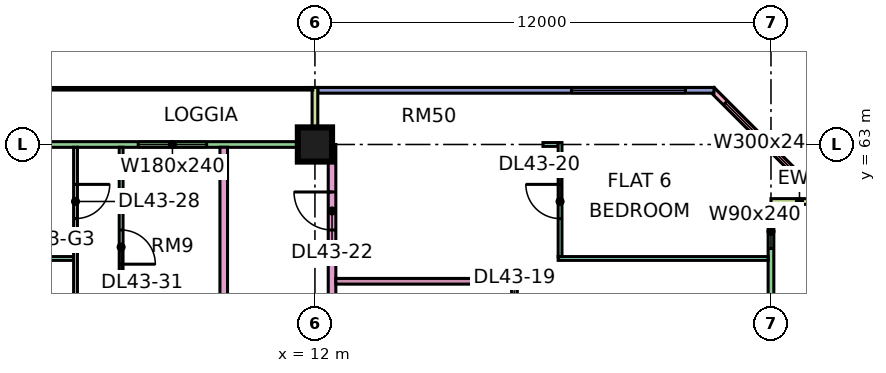
"""IFC4 building model, lengths in metres.
Left out: names, types, materials, properties, quantities, classifications, styles, units other than length and angle.
Written with IfcOpenShell. Run it as: python <this file> out.ifc"""

import sys

from ifc_helpers import new_model, si_unit, direction, frame, frame_2d, origin, origin_2d, place, context, subcontext, project, spatial, rectangle, extrude, element, fill, save


model = new_model("IFC4")
c1 = context("Model", 3, precision=1e-05, world=origin(), true_north=direction((0.0, 1.0)))
c2 = subcontext(c1, "Body", "Model", "MODEL_VIEW")
j1 = project(units=[si_unit("LENGTHUNIT", "METRE"), si_unit("PLANEANGLEUNIT", "RADIAN")], contexts=[c1])
p1 = place(None, origin())
s1 = spatial("IfcSite", under=j1, at=p1, CompositionType="ELEMENT")
p2 = place(p1, origin())
s2 = spatial("IfcBuilding", under=s1, at=p2, CompositionType="ELEMENT")
p3 = place(p2, frame((0.0, 0.0, 187.4)))
s3 = spatial("IfcBuildingStorey", under=s2, at=p3, CompositionType="ELEMENT", Elevation=187.4)
p4 = place(p3, frame((12.0, 63.0, 0.0), z_axis=(0.0, 0.0, 1.0), x_axis=(1.0, 0.0, 0.0)))
e1 = element("IfcColumn", 1, at=p4, inside=s3, PredefinedType="COLUMN", context=c2, shape_type="SweptSolid", body=[
    extrude(rectangle(XDim=0.9, YDim=0.9, at=origin_2d()), origin(), (0.0, 0.0, 1.0), 3.75),
])
p5 = place(p3, frame((24.0, 48.075, 0.0), z_axis=(0.0, 0.0, 1.0), x_axis=(0.0, 1.0, 0.0)))
e2 = element("IfcWall", 2, at=p5, inside=s3, PredefinedType="SOLIDWALL", context=c2, shape_type="SweptSolid", body=[
    extrude(rectangle(XDim=13.35, YDim=0.15, at=frame_2d((6.675, 0.0))), origin(), (0.0, 0.0, 1.0), 3.35),
])
p6 = place(p5, frame((0.587, 0.0, 0.45)))
e3 = element("IfcOpeningElement", 3, at=p6, cuts=e2, PredefinedType="OPENING", context=c2, shape_type="SweptSolid", body=[
    extrude(rectangle(XDim=4.2, YDim=2.4, at=frame_2d((2.1, 1.2))), frame((0.0, 0.085, 0.0), z_axis=(0.0, -1.0, 0.0), x_axis=(1.0, 0.0, 0.0)), (0.0, 0.0, 1.0), 0.17),
])
p7 = place(p5, frame((8.3, 0.0, 0.0)))
e4 = element("IfcOpeningElement", 4, at=p7, cuts=e2, PredefinedType="OPENING", context=c2, shape_type="SweptSolid", body=[
    extrude(rectangle(XDim=1.8, YDim=2.4, at=frame_2d((0.9, 1.2))), frame((0.0, 0.085, 0.0), z_axis=(0.0, -1.0, 0.0), x_axis=(1.0, 0.0, 0.0)), (0.0, 0.0, 1.0), 0.17),
])
p8 = place(p5, frame((12.188, 0.0, 0.45)))
e5 = element("IfcOpeningElement", 5, at=p8, cuts=e2, PredefinedType="OPENING", context=c2, shape_type="SweptSolid", body=[
    extrude(rectangle(XDim=0.9, YDim=2.4, at=frame_2d((0.45, 1.2))), frame((0.0, 0.085, 0.0), z_axis=(0.0, -1.0, 0.0), x_axis=(1.0, 0.0, 0.0)), (0.0, 0.0, 1.0), 0.17),
])
p9 = place(p3, frame((25.5, 61.5, 0.0), z_axis=(0.0, 0.0, 1.0), x_axis=(-1.0, 0.0, 0.0)))
e6 = element("IfcWall", 6, at=p9, inside=s3, PredefinedType="SOLIDWALL", context=c2, shape_type="SweptSolid", body=[
    extrude(rectangle(XDim=1.5, YDim=0.15, at=frame_2d((0.75, 0.0))), origin(), (0.0, 0.0, 1.0), 3.35),
])
p10 = place(p3, frame((25.447, 61.447, 0.0), z_axis=(0.0, 0.0, 1.0), x_axis=(-0.707106781187, 0.707106781187, 0.0)))
e7 = element("IfcWall", 7, at=p10, inside=s3, PredefinedType="SOLIDWALL", context=c2, shape_type="SweptSolid", body=[
    extrude(rectangle(XDim=4.243, YDim=0.15, at=frame_2d((2.121, 0.0))), origin(), (0.0, 0.0, 1.0), 3.35),
])
p11 = place(p10, frame((0.744, 0.0, 0.45)))
e8 = element("IfcOpeningElement", 8, at=p11, cuts=e7, PredefinedType="OPENING", context=c2, shape_type="SweptSolid", body=[
    extrude(rectangle(XDim=3.0, YDim=2.4, at=frame_2d((1.5, 1.2))), frame((0.0, 0.085, 0.0), z_axis=(0.0, -1.0, 0.0), x_axis=(1.0, 0.0, 0.0)), (0.0, 0.0, 1.0), 0.17),
])
p12 = place(p3, frame((22.5, 64.425, 0.0), z_axis=(0.0, 0.0, 1.0), x_axis=(-1.0, 0.0, 0.0)))
e9 = element("IfcWall", 9, at=p12, inside=s3, PredefinedType="SOLIDWALL", context=c2, shape_type="SweptSolid", body=[
    extrude(rectangle(XDim=10.425, YDim=0.15, at=frame_2d((5.212, 0.0))), origin(), (0.0, 0.0, 1.0), 3.35),
])
p13 = place(p12, frame((0.75, 0.0, 0.45)))
e10 = element("IfcOpeningElement", 10, at=p13, cuts=e9, PredefinedType="OPENING", context=c2, shape_type="SweptSolid", body=[
    extrude(rectangle(XDim=3.0, YDim=2.4, at=frame_2d((1.5, 1.2))), frame((0.0, 0.085, 0.0), z_axis=(0.0, -1.0, 0.0), x_axis=(1.0, 0.0, 0.0)), (0.0, 0.0, 1.0), 0.17),
])
p14 = place(p3, frame((11.925, 63.0, 0.0), z_axis=(0.0, 0.0, 1.0), x_axis=(-1.0, 0.0, 0.0)))
e11 = element("IfcWall", 11, at=p14, inside=s3, PredefinedType="SOLIDWALL", context=c2, shape_type="SweptSolid", body=[
    extrude(rectangle(XDim=10.35, YDim=0.15, at=frame_2d((5.175, 0.0))), origin(), (0.0, 0.0, 1.0), 3.35),
])
p15 = place(p14, frame((2.775, 0.0, 0.45)))
e12 = element("IfcOpeningElement", 12, at=p15, cuts=e11, PredefinedType="OPENING", context=c2, shape_type="SweptSolid", body=[
    extrude(rectangle(XDim=1.8, YDim=2.4, at=frame_2d((0.9, 1.2))), frame((0.0, 0.085, 0.0), z_axis=(0.0, -1.0, 0.0), x_axis=(1.0, 0.0, 0.0)), (0.0, 0.0, 1.0), 0.17),
])
p16 = place(p14, frame((7.387, 0.0, 0.0)))
e13 = element("IfcOpeningElement", 13, at=p16, cuts=e11, PredefinedType="OPENING", context=c2, shape_type="SweptSolid", body=[
    extrude(rectangle(XDim=1.8, YDim=2.4, at=frame_2d((0.9, 1.2))), frame((0.0, 0.085, 0.0), z_axis=(0.0, -1.0, 0.0), x_axis=(1.0, 0.0, 0.0)), (0.0, 0.0, 1.0), 0.17),
])
p17 = place(p3, frame((12.0, 64.5, 0.0), z_axis=(0.0, 0.0, 1.0), x_axis=(0.0, -1.0, 0.0)))
e14 = element("IfcWall", 14, at=p17, inside=s3, PredefinedType="SOLIDWALL", context=c2, shape_type="SweptSolid", body=[
    extrude(rectangle(XDim=1.5, YDim=0.15, at=frame_2d((0.75, 0.0))), origin(), (0.0, 0.0, 1.0), 3.35),
])
p18 = place(p3, frame((0.074, 60.0, 0.0), z_axis=(0.0, 0.0, 1.0), x_axis=(1.0, 0.0, 0.0)))
e15 = element("IfcWall", 15, at=p18, inside=s3, PredefinedType="PARTITIONING", context=c2, shape_type="SweptSolid", body=[
    extrude(rectangle(XDim=5.576, YDim=0.1, at=frame_2d((2.788, 0.0))), origin(), (0.0, 0.0, 1.0), 3.35),
])
p19 = place(p3, frame((5.7, 36.1, 0.0), z_axis=(0.0, 0.0, 1.0), x_axis=(0.0, 1.0, 0.0)))
e16 = element("IfcWall", 16, at=p19, inside=s3, PredefinedType="PARTITIONING", context=c2, shape_type="SweptSolid", body=[
    extrude(rectangle(XDim=26.826, YDim=0.1, at=frame_2d((13.413, 0.0))), origin(), (0.0, 0.0, 1.0), 3.35),
])
p20 = place(p19, frame((9.95, 0.0, 0.0)))
e17 = element("IfcOpeningElement", 17, at=p20, cuts=e16, PredefinedType="OPENING", context=c2, shape_type="SweptSolid", body=[
    extrude(rectangle(XDim=0.9, YDim=2.1, at=frame_2d((0.45, 1.05))), frame((0.0, 0.06, 0.0), z_axis=(0.0, -1.0, 0.0), x_axis=(1.0, 0.0, 0.0)), (0.0, 0.0, 1.0), 0.12),
])
p21 = place(p19, frame((12.95, 0.0, 0.0)))
e18 = element("IfcOpeningElement", 18, at=p21, cuts=e16, PredefinedType="OPENING", context=c2, shape_type="SweptSolid", body=[
    extrude(rectangle(XDim=0.9, YDim=2.1, at=frame_2d((0.45, 1.05))), frame((0.0, 0.06, 0.0), z_axis=(0.0, -1.0, 0.0), x_axis=(1.0, 0.0, 0.0)), (0.0, 0.0, 1.0), 0.12),
])
p22 = place(p19, frame((15.95, 0.0, 0.0)))
e19 = element("IfcOpeningElement", 19, at=p22, cuts=e16, PredefinedType="OPENING", context=c2, shape_type="SweptSolid", body=[
    extrude(rectangle(XDim=0.9, YDim=2.1, at=frame_2d((0.45, 1.05))), frame((0.0, 0.06, 0.0), z_axis=(0.0, -1.0, 0.0), x_axis=(1.0, 0.0, 0.0)), (0.0, 0.0, 1.0), 0.12),
])
p23 = place(p19, frame((18.95, 0.0, 0.0)))
e20 = element("IfcOpeningElement", 20, at=p23, cuts=e16, PredefinedType="OPENING", context=c2, shape_type="SweptSolid", body=[
    extrude(rectangle(XDim=0.9, YDim=2.1, at=frame_2d((0.45, 1.05))), frame((0.0, 0.06, 0.0), z_axis=(0.0, -1.0, 0.0), x_axis=(1.0, 0.0, 0.0)), (0.0, 0.0, 1.0), 0.12),
])
p24 = place(p19, frame((24.95, 0.0, 0.0)))
e21 = element("IfcOpeningElement", 21, at=p24, cuts=e16, PredefinedType="OPENING", context=c2, shape_type="SweptSolid", body=[
    extrude(rectangle(XDim=0.9, YDim=2.1, at=frame_2d((0.45, 1.05))), frame((0.0, 0.06, 0.0), z_axis=(0.0, -1.0, 0.0), x_axis=(1.0, 0.0, 0.0)), (0.0, 0.0, 1.0), 0.12),
])
p25 = place(p19, frame((3.95, 0.0, 0.0)))
e22 = element("IfcOpeningElement", 22, at=p25, cuts=e16, PredefinedType="OPENING", context=c2, shape_type="SweptSolid", body=[
    extrude(rectangle(XDim=0.9, YDim=2.1, at=frame_2d((0.45, 1.05))), frame((0.0, 0.06, 0.0), z_axis=(0.0, -1.0, 0.0), x_axis=(1.0, 0.0, 0.0)), (0.0, 0.0, 1.0), 0.12),
])
p26 = place(p19, frame((21.95, 0.0, 0.0)))
e23 = element("IfcOpeningElement", 23, at=p26, cuts=e16, PredefinedType="OPENING", context=c2, shape_type="SweptSolid", body=[
    extrude(rectangle(XDim=0.9, YDim=2.1, at=frame_2d((0.45, 1.05))), frame((0.0, 0.06, 0.0), z_axis=(0.0, -1.0, 0.0), x_axis=(1.0, 0.0, 0.0)), (0.0, 0.0, 1.0), 0.12),
])
p27 = place(p3, frame((6.9, 53.65, 0.0), z_axis=(0.0, 0.0, 1.0), x_axis=(0.0, 1.0, 0.0)))
e24 = element("IfcWall", 24, at=p27, inside=s3, PredefinedType="PARTITIONING", context=c2, shape_type="SweptSolid", body=[
    extrude(rectangle(XDim=9.276, YDim=0.1, at=frame_2d((4.638, 0.0))), origin(), (0.0, 0.0, 1.0), 3.35),
])
p28 = place(p27, frame((1.55, 0.0, 0.0)))
e25 = element("IfcOpeningElement", 25, at=p28, cuts=e24, PredefinedType="OPENING", context=c2, shape_type="SweptSolid", body=[
    extrude(rectangle(XDim=0.9, YDim=2.1, at=frame_2d((0.45, 1.05))), frame((0.0, 0.06, 0.0), z_axis=(0.0, -1.0, 0.0), x_axis=(1.0, 0.0, 0.0)), (0.0, 0.0, 1.0), 0.12),
])
p29 = place(p27, frame((6.2, 0.0, 0.0)))
e26 = element("IfcOpeningElement", 26, at=p29, cuts=e24, PredefinedType="OPENING", context=c2, shape_type="SweptSolid", body=[
    extrude(rectangle(XDim=0.9, YDim=2.1, at=frame_2d((0.45, 1.05))), frame((0.0, 0.06, 0.0), z_axis=(0.0, -1.0, 0.0), x_axis=(1.0, 0.0, 0.0)), (0.0, 0.0, 1.0), 0.12),
])
p30 = place(p3, frame((9.6, 20.0, 0.0), z_axis=(0.0, 0.0, 1.0), x_axis=(0.0, 1.0, 0.0)))
e27 = element("IfcWall", 27, at=p30, inside=s3, PredefinedType="PARTITIONING", context=c2, shape_type="SweptSolid", body=[
    extrude(rectangle(XDim=42.926, YDim=0.2, at=frame_2d((21.463, 0.0))), origin(), (0.0, 0.0, 1.0), 3.35),
])
p31 = place(p30, frame((31.65, 0.0, 0.0)))
e28 = element("IfcOpeningElement", 28, at=p31, cuts=e27, PredefinedType="OPENING", context=c2, shape_type="SweptSolid", body=[
    extrude(rectangle(XDim=1.0, YDim=2.1, at=frame_2d((0.5, 1.05))), frame((0.0, 0.11, 0.0), z_axis=(0.0, -1.0, 0.0), x_axis=(1.0, 0.0, 0.0)), (0.0, 0.0, 1.0), 0.22),
])
p32 = place(p30, frame((0.6, 0.0, 0.0)))
e29 = element("IfcOpeningElement", 29, at=p32, cuts=e27, PredefinedType="OPENING", context=c2, shape_type="SweptSolid", body=[
    extrude(rectangle(XDim=1.2, YDim=2.1, at=frame_2d((0.6, 1.05))), frame((0.0, 0.11, 0.0), z_axis=(0.0, -1.0, 0.0), x_axis=(1.0, 0.0, 0.0)), (0.0, 0.0, 1.0), 0.22),
])
p33 = place(p30, frame((13.65, 0.0, 0.0)))
e30 = element("IfcOpeningElement", 30, at=p33, cuts=e27, PredefinedType="OPENING", context=c2, shape_type="SweptSolid", body=[
    extrude(rectangle(XDim=1.0, YDim=2.1, at=frame_2d((0.5, 1.05))), frame((0.0, 0.11, 0.0), z_axis=(0.0, -1.0, 0.0), x_axis=(1.0, 0.0, 0.0)), (0.0, 0.0, 1.0), 0.22),
])
p34 = place(p3, frame((12.45, 20.0, 0.0), z_axis=(0.0, 0.0, 1.0), x_axis=(0.0, 1.0, 0.0)))
e31 = element("IfcWall", 31, at=p34, inside=s3, PredefinedType="PARTITIONING", context=c2, shape_type="SweptSolid", body=[
    extrude(rectangle(XDim=43.0, YDim=0.2, at=frame_2d((21.5, 0.0))), origin(), (0.0, 0.0, 1.0), 3.35),
])
p35 = place(p34, frame((6.7, 0.0, 0.0)))
e32 = element("IfcOpeningElement", 32, at=p35, cuts=e31, PredefinedType="OPENING", context=c2, shape_type="SweptSolid", body=[
    extrude(rectangle(XDim=1.6, YDim=2.1, at=frame_2d((0.8, 1.05))), frame((0.0, 0.11, 0.0), z_axis=(0.0, -1.0, 0.0), x_axis=(1.0, 0.0, 0.0)), (0.0, 0.0, 1.0), 0.22),
])
p36 = place(p34, frame((12.95, 0.0, 0.0)))
e33 = element("IfcOpeningElement", 33, at=p36, cuts=e31, PredefinedType="OPENING", context=c2, shape_type="SweptSolid", body=[
    extrude(rectangle(XDim=1.0, YDim=2.1, at=frame_2d((0.5, 1.05))), frame((0.0, 0.11, 0.0), z_axis=(0.0, -1.0, 0.0), x_axis=(1.0, 0.0, 0.0)), (0.0, 0.0, 1.0), 0.22),
])
p37 = place(p34, frame((16.9, 0.0, 0.0)))
e34 = element("IfcOpeningElement", 34, at=p37, cuts=e31, PredefinedType="OPENING", context=c2, shape_type="SweptSolid", body=[
    extrude(rectangle(XDim=1.0, YDim=2.1, at=frame_2d((0.5, 1.05))), frame((0.0, 0.11, 0.0), z_axis=(0.0, -1.0, 0.0), x_axis=(1.0, 0.0, 0.0)), (0.0, 0.0, 1.0), 0.22),
])
p38 = place(p34, frame((40.75, 0.0, 0.0)))
e35 = element("IfcOpeningElement", 35, at=p38, cuts=e31, PredefinedType="OPENING", context=c2, shape_type="SweptSolid", body=[
    extrude(rectangle(XDim=1.0, YDim=2.1, at=frame_2d((0.5, 1.05))), frame((0.0, 0.11, 0.0), z_axis=(0.0, -1.0, 0.0), x_axis=(1.0, 0.0, 0.0)), (0.0, 0.0, 1.0), 0.22),
])
p39 = place(p34, frame((1.15, 0.0, 0.0)))
e36 = element("IfcOpeningElement", 36, at=p39, cuts=e31, PredefinedType="OPENING", context=c2, shape_type="SweptSolid", body=[
    extrude(rectangle(XDim=1.8, YDim=2.1, at=frame_2d((0.9, 1.05))), frame((0.0, 0.11, 0.0), z_axis=(0.0, -1.0, 0.0), x_axis=(1.0, 0.0, 0.0)), (0.0, 0.0, 1.0), 0.22),
])
p40 = place(p34, frame((28.6, 0.0, 0.0)))
e37 = element("IfcOpeningElement", 37, at=p40, cuts=e31, PredefinedType="OPENING", context=c2, shape_type="SweptSolid", body=[
    extrude(rectangle(XDim=1.8, YDim=2.1, at=frame_2d((0.9, 1.05))), frame((0.0, 0.11, 0.0), z_axis=(0.0, -1.0, 0.0), x_axis=(1.0, 0.0, 0.0)), (0.0, 0.0, 1.0), 0.22),
])
p41 = place(p3, frame((12.55, 59.4, 0.0), z_axis=(0.0, 0.0, 1.0), x_axis=(1.0, 0.0, 0.0)))
e38 = element("IfcWall", 38, at=p41, inside=s3, PredefinedType="PARTITIONING", context=c2, shape_type="SweptSolid", body=[
    extrude(rectangle(XDim=4.625, YDim=0.15, at=frame_2d((2.312, 0.0))), origin(), (0.0, 0.0, 1.0), 3.35),
])
p42 = place(p3, frame((17.25, 54.1, 0.0), z_axis=(0.0, 0.0, 1.0), x_axis=(0.0, 1.0, 0.0)))
e39 = element("IfcWall", 39, at=p42, inside=s3, PredefinedType="PARTITIONING", context=c2, shape_type="SweptSolid", body=[
    extrude(rectangle(XDim=5.375, YDim=0.15, at=frame_2d((2.688, 0.0))), origin(), (0.0, 0.0, 1.0), 3.35),
])
p43 = place(p42, frame((3.9, 0.0, 0.0)))
e40 = element("IfcOpeningElement", 40, at=p43, cuts=e39, PredefinedType="OPENING", context=c2, shape_type="SweptSolid", body=[
    extrude(rectangle(XDim=0.8, YDim=2.1, at=frame_2d((0.4, 1.05))), frame((0.0, 0.085, 0.0), z_axis=(0.0, -1.0, 0.0), x_axis=(1.0, 0.0, 0.0)), (0.0, 0.0, 1.0), 0.17),
])
p44 = place(p42, frame((1.1, 0.0, 0.0)))
e41 = element("IfcOpeningElement", 41, at=p44, cuts=e39, PredefinedType="OPENING", context=c2, shape_type="SweptSolid", body=[
    extrude(rectangle(XDim=0.9, YDim=2.1, at=frame_2d((0.45, 1.05))), frame((0.0, 0.085, 0.0), z_axis=(0.0, -1.0, 0.0), x_axis=(1.0, 0.0, 0.0)), (0.0, 0.0, 1.0), 0.17),
])
p45 = place(p3, frame((18.0, 63.0, 0.0), z_axis=(0.0, 0.0, 1.0), x_axis=(1.0, 0.0, 0.0)))
e42 = element("IfcWall", 42, at=p45, inside=s3, PredefinedType="PARTITIONING", context=c2, shape_type="SweptSolid", body=[
    extrude(rectangle(XDim=0.4, YDim=0.1, at=frame_2d((0.2, 0.0))), origin(), (0.0, 0.0, 1.0), 3.35),
])
p46 = place(p3, frame((18.4, 60.0, 0.0), z_axis=(0.0, 0.0, 1.0), x_axis=(1.0, 0.0, 0.0)))
e43 = element("IfcWall", 43, at=p46, inside=s3, PredefinedType="PARTITIONING", context=c2, shape_type="SweptSolid", body=[
    extrude(rectangle(XDim=5.526, YDim=0.1, at=frame_2d((2.763, 0.0))), origin(), (0.0, 0.0, 1.0), 3.35),
])
p47 = place(p3, frame((18.45, 60.05, 0.0), z_axis=(0.0, 0.0, 1.0), x_axis=(0.0, 1.0, 0.0)))
e44 = element("IfcWall", 44, at=p47, inside=s3, PredefinedType="PARTITIONING", context=c2, shape_type="SweptSolid", body=[
    extrude(rectangle(XDim=3.0, YDim=0.1, at=frame_2d((1.5, 0.0))), origin(), (0.0, 0.0, 1.0), 3.35),
])
p48 = place(p47, frame((1.0, 0.0, 0.0)))
e45 = element("IfcOpeningElement", 45, at=p48, cuts=e44, PredefinedType="OPENING", context=c2, shape_type="SweptSolid", body=[
    extrude(rectangle(XDim=0.9, YDim=2.1, at=frame_2d((0.45, 1.05))), frame((0.0, 0.06, 0.0), z_axis=(0.0, -1.0, 0.0), x_axis=(1.0, 0.0, 0.0)), (0.0, 0.0, 1.0), 0.12),
])
p49 = place(p8, origin())
e46 = element("IfcWindow", 46, at=p49, inside=s3, PartitioningType="SINGLE_PANEL", PredefinedType="WINDOW", context=c2, shape_type="SweptSolid", body=[
    extrude(rectangle(XDim=0.9, YDim=2.4, at=frame_2d((0.45, 1.2))), frame((0.0, 0.03, 0.0), z_axis=(0.0, -1.0, 0.0), x_axis=(1.0, 0.0, 0.0)), (0.0, 0.0, 1.0), 0.06),
])
fill(e5, e46)
p50 = place(p11, origin())
e47 = element("IfcWindow", 47, at=p50, inside=s3, PartitioningType="SINGLE_PANEL", PredefinedType="WINDOW", context=c2, shape_type="SweptSolid", body=[
    extrude(rectangle(XDim=3.0, YDim=2.4, at=frame_2d((1.5, 1.2))), frame((0.0, 0.03, 0.0), z_axis=(0.0, -1.0, 0.0), x_axis=(1.0, 0.0, 0.0)), (0.0, 0.0, 1.0), 0.06),
])
fill(e8, e47)
p51 = place(p13, origin())
e48 = element("IfcWindow", 48, at=p51, inside=s3, PartitioningType="SINGLE_PANEL", PredefinedType="WINDOW", context=c2, shape_type="SweptSolid", body=[
    extrude(rectangle(XDim=3.0, YDim=2.4, at=frame_2d((1.5, 1.2))), frame((0.0, 0.03, 0.0), z_axis=(0.0, -1.0, 0.0), x_axis=(1.0, 0.0, 0.0)), (0.0, 0.0, 1.0), 0.06),
])
fill(e10, e48)
p52 = place(p15, origin())
e49 = element("IfcWindow", 49, at=p52, inside=s3, PartitioningType="SINGLE_PANEL", PredefinedType="WINDOW", context=c2, shape_type="SweptSolid", body=[
    extrude(rectangle(XDim=1.8, YDim=2.4, at=frame_2d((0.9, 1.2))), frame((0.0, 0.03, 0.0), z_axis=(0.0, -1.0, 0.0), x_axis=(1.0, 0.0, 0.0)), (0.0, 0.0, 1.0), 0.06),
])
fill(e12, e49)
p53 = place(p48, frame((0.9, 0.0, 0.0), z_axis=(0.0, 0.0, 1.0), x_axis=(-1.0, 0.0, 0.0)))
e50 = element("IfcDoor", 50, at=p53, inside=s3, OperationType="SINGLE_SWING_RIGHT", PredefinedType="DOOR", context=c2, shape_type="SweptSolid", body=[
    extrude(rectangle(XDim=0.9, YDim=2.1, at=frame_2d((0.45, 1.05))), frame((0.0, 0.025, 0.0), z_axis=(0.0, -1.0, 0.0), x_axis=(1.0, 0.0, 0.0)), (0.0, 0.0, 1.0), 0.05),
])
fill(e45, e50)
p54 = place(p38, frame((1.0, 0.0, 0.0), z_axis=(0.0, 0.0, 1.0), x_axis=(-1.0, 0.0, 0.0)))
e51 = element("IfcDoor", 51, at=p54, inside=s3, OperationType="SINGLE_SWING_RIGHT", PredefinedType="DOOR", context=c2, shape_type="SweptSolid", body=[
    extrude(rectangle(XDim=1.0, YDim=2.1, at=frame_2d((0.5, 1.05))), frame((0.0, 0.025, 0.0), z_axis=(0.0, -1.0, 0.0), x_axis=(1.0, 0.0, 0.0)), (0.0, 0.0, 1.0), 0.05),
])
fill(e35, e51)
p55 = place(p24, origin())
e52 = element("IfcDoor", 52, at=p55, inside=s3, OperationType="SINGLE_SWING_RIGHT", PredefinedType="DOOR", context=c2, shape_type="SweptSolid", body=[
    extrude(rectangle(XDim=0.9, YDim=2.1, at=frame_2d((0.45, 1.05))), frame((0.0, 0.025, 0.0), z_axis=(0.0, -1.0, 0.0), x_axis=(1.0, 0.0, 0.0)), (0.0, 0.0, 1.0), 0.05),
])
fill(e21, e52)
p56 = place(p29, frame((0.9, 0.0, 0.0), z_axis=(0.0, 0.0, 1.0), x_axis=(-1.0, 0.0, 0.0)))
e53 = element("IfcDoor", 53, at=p56, inside=s3, OperationType="SINGLE_SWING_LEFT", PredefinedType="DOOR", context=c2, shape_type="SweptSolid", body=[
    extrude(rectangle(XDim=0.9, YDim=2.1, at=frame_2d((0.45, 1.05))), frame((0.0, 0.025, 0.0), z_axis=(0.0, -1.0, 0.0), x_axis=(1.0, 0.0, 0.0)), (0.0, 0.0, 1.0), 0.05),
])
fill(e26, e53)
save(model, sys.argv[1])
